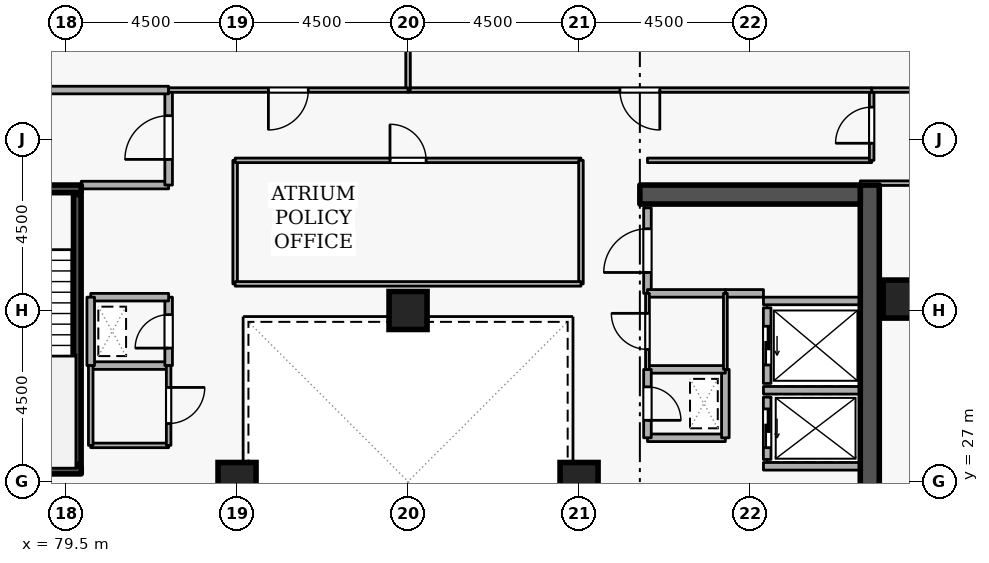
"""IFC4 building model, lengths in metres.
Left out: names, types, materials, properties, quantities, classifications, styles, units other than length and angle.
Written with IfcOpenShell. Run it as: python <this file> out.ifc"""

import sys

from ifc_helpers import new_model, si_unit, direction, frame, frame_2d, origin, origin_2d, place, context, subcontext, project, spatial, rectangle, extrude, element, fill, save


model = new_model("IFC4")
c1 = context("Model", 3, precision=1e-05, world=origin(), true_north=direction((0.0, 1.0)))
c2 = subcontext(c1, "Body", "Model", "MODEL_VIEW")
j1 = project(units=[si_unit("LENGTHUNIT", "METRE"), si_unit("PLANEANGLEUNIT", "RADIAN")], contexts=[c1])
p1 = place(None, origin())
s1 = spatial("IfcSite", under=j1, at=p1, CompositionType="ELEMENT")
p2 = place(p1, origin())
s2 = spatial("IfcBuilding", under=s1, at=p2, CompositionType="ELEMENT")
p3 = place(p2, frame((0.0, 0.0, 236.7)))
s3 = spatial("IfcBuildingStorey", under=s2, at=p3, CompositionType="ELEMENT", Elevation=236.7)
p4 = place(p3, frame((100.65, 19.2, 0.0), z_axis=(0.0, 0.0, 1.0), x_axis=(0.0, 1.0, 0.0)))
e1 = element("IfcWall", 1, at=p4, inside=s3, PredefinedType="SHEAR", context=c2, shape_type="SweptSolid", body=[
    extrude(rectangle(XDim=15.6, YDim=0.5, at=frame_2d((7.8, 0.0))), origin(), (0.0, 0.0, 1.0), 3.6),
])
p5 = place(p3, frame((94.6, 34.55, 0.0), z_axis=(0.0, 0.0, 1.0), x_axis=(1.0, 0.0, 0.0)))
e2 = element("IfcWall", 2, at=p5, inside=s3, PredefinedType="SHEAR", context=c2, shape_type="SweptSolid", body=[
    extrude(rectangle(XDim=5.8, YDim=0.5, at=frame_2d((2.9, 0.0))), origin(), (0.0, 0.0, 1.0), 3.6),
])
for number, where, z_axis, x_axis in (
    (3, (101.5, 31.8, 0.0), (0.0, 0.0, 1.0), (1.0, 0.0, 0.0)),
    (4, (93.0, 27.0, 0.0), (0.0, 0.0, 1.0), (1.0, 0.0, 0.0)),
    (5, (84.0, 27.0, 0.0), (0.0, 0.0, 1.0), (1.0, 0.0, 0.0)),
    (6, (88.5, 31.5, 0.0), (0.0, 0.0, 1.0), (1.0, 0.0, 0.0)),
):
    element("IfcColumn", number, at=place(p3, frame(where, z_axis=z_axis, x_axis=x_axis)), inside=s3, PredefinedType="COLUMN", context=c2, shape_type="SweptSolid", body=[
        extrude(rectangle(XDim=1.0, YDim=1.0, at=origin_2d()), origin(), (0.0, 0.0, 1.0), 3.6),
    ])
p6 = place(p3, frame((97.95, 29.22, 0.0), z_axis=(0.0, 0.0, 1.0), x_axis=(0.0, -1.0, 0.0)))
e7 = element("IfcWall", 7, at=p6, inside=s3, PredefinedType="STANDARD", context=c2, shape_type="SweptSolid", body=[
    extrude(rectangle(XDim=1.64, YDim=0.2, at=frame_2d((0.82, 0.0))), origin(), (0.0, 0.0, 1.0), 3.34),
])
p7 = place(p6, frame((0.31, 0.0, 0.0)))
e8 = element("IfcOpeningElement", 8, at=p7, cuts=e7, PredefinedType="OPENING", context=c2, shape_type="SweptSolid", body=[
    extrude(rectangle(XDim=1.02, YDim=2.06, at=frame_2d((0.51, 1.03))), frame((0.0, 0.11, 0.0), z_axis=(0.0, -1.0, 0.0), x_axis=(1.0, 0.0, 0.0)), (0.0, 0.0, 1.0), 0.22),
])
p8 = place(p3, frame((97.95, 31.57, 0.0), z_axis=(0.0, 0.0, 1.0), x_axis=(0.0, -1.0, 0.0)))
e9 = element("IfcWall", 9, at=p8, inside=s3, PredefinedType="STANDARD", context=c2, shape_type="SweptSolid", body=[
    extrude(rectangle(XDim=1.99, YDim=0.2, at=frame_2d((0.995, 0.0))), origin(), (0.0, 0.0, 1.0), 3.34),
])
p9 = place(p8, frame((0.485, 0.0, 0.0)))
e10 = element("IfcOpeningElement", 10, at=p9, cuts=e9, PredefinedType="OPENING", context=c2, shape_type="SweptSolid", body=[
    extrude(rectangle(XDim=1.02, YDim=2.06, at=frame_2d((0.51, 1.03))), frame((0.0, 0.11, 0.0), z_axis=(0.0, -1.0, 0.0), x_axis=(1.0, 0.0, 0.0)), (0.0, 0.0, 1.0), 0.22),
])
for number, where, z_axis, x_axis in (
    (11, (97.852, 29.4, 0.0), (0.0, 0.0, 1.0), (1.0, 0.0, 0.0)),
    (12, (97.852, 27.4, 0.0), (0.0, 0.0, 1.0), (1.0, 0.0, 0.0)),
    (13, (97.852, 31.75, 0.0), (0.0, 0.0, 1.0), (1.0, 0.0, 0.0)),
):
    element("IfcWall", number, at=place(p3, frame(where, z_axis=z_axis, x_axis=x_axis)), inside=s3, PredefinedType="STANDARD", context=c2, shape_type="SweptSolid", body=[
        extrude(rectangle(XDim=2.536, YDim=0.2, at=frame_2d((1.268, 0.0))), origin(), (0.0, 0.0, 1.0), 3.34),
    ])
p10 = place(p3, frame((76.55, 34.7, 0.0), z_axis=(0.0, 0.0, 1.0), x_axis=(1.0, 0.0, 0.0)))
e14 = element("IfcWall", 14, at=p10, inside=s3, PredefinedType="SHEAR", context=c2, shape_type="SweptSolid", body=[
    extrude(rectangle(XDim=3.35, YDim=0.2, at=frame_2d((1.675, 0.0))), origin(), (0.0, 0.0, 1.0), 3.6),
])
p11 = place(p10, frame((1.125, 0.0, 0.0)))
e15 = element("IfcOpeningElement", 15, at=p11, cuts=e14, PredefinedType="OPENING", context=c2, shape_type="SweptSolid", body=[
    extrude(rectangle(XDim=1.1, YDim=2.1, at=frame_2d((0.55, 1.05))), frame((0.0, 0.11, 0.0), z_axis=(0.0, -1.0, 0.0), x_axis=(1.0, 0.0, 0.0)), (0.0, 0.0, 1.0), 0.22),
])
p12 = place(p3, frame((79.9, 27.3, 0.0), z_axis=(0.0, 0.0, 1.0), x_axis=(-1.0, 0.0, 0.0)))
e16 = element("IfcWall", 16, at=p12, inside=s3, PredefinedType="SHEAR", context=c2, shape_type="SweptSolid", body=[
    extrude(rectangle(XDim=3.35, YDim=0.2, at=frame_2d((1.675, 0.0))), origin(), (0.0, 0.0, 1.0), 3.6),
])
p13 = place(p3, frame((79.797, 27.45, 0.0), z_axis=(0.0, 0.0, 1.0), x_axis=(0.0, 1.0, 0.0)))
e17 = element("IfcWall", 17, at=p13, inside=s3, PredefinedType="SHEAR", context=c2, shape_type="SweptSolid", body=[
    extrude(rectangle(XDim=7.1, YDim=0.2, at=frame_2d((3.55, 0.0))), origin(), (0.0, 0.0, 1.0), 3.6),
])
p14 = place(p3, frame((79.9, 34.8, 0.0), z_axis=(0.0, 0.0, 1.0), x_axis=(1.0, 0.0, 0.0)))
e18 = element("IfcWall", 18, at=p14, inside=s3, PredefinedType="STANDARD", context=c2, shape_type="SweptSolid", body=[
    extrude(rectangle(XDim=2.3, YDim=0.2, at=frame_2d((1.15, 0.0))), origin(), (0.0, 0.0, 1.0), 2.545),
])
p15 = place(p3, frame((82.2, 34.8, 0.0), z_axis=(0.0, 0.0, 1.0), x_axis=(0.0, 1.0, 0.0)))
e19 = element("IfcWall", 19, at=p15, inside=s3, PredefinedType="STANDARD", context=c2, shape_type="SweptSolid", body=[
    extrude(rectangle(XDim=2.5, YDim=0.2, at=frame_2d((1.25, 0.0))), origin(), (0.0, 0.0, 1.0), 3.34),
])
p16 = place(p15, frame((0.675, 0.0, 0.0)))
e20 = element("IfcOpeningElement", 20, at=p16, cuts=e19, PredefinedType="OPENING", context=c2, shape_type="SweptSolid", body=[
    extrude(rectangle(XDim=1.15, YDim=2.1, at=frame_2d((0.575, 1.05))), frame((0.0, 0.11, 0.0), z_axis=(0.0, -1.0, 0.0), x_axis=(1.0, 0.0, 0.0)), (0.0, 0.0, 1.0), 0.22),
])
p17 = place(p3, frame((82.2, 37.3, 0.0), z_axis=(0.0, 0.0, 1.0), x_axis=(-1.0, 0.0, 0.0)))
e21 = element("IfcWall", 21, at=p17, inside=s3, PredefinedType="STANDARD", context=c2, shape_type="SweptSolid", body=[
    extrude(rectangle(XDim=5.7, YDim=0.2, at=frame_2d((2.85, 0.0))), origin(), (0.0, 0.0, 1.0), 3.34),
])
p18 = place(p3, frame((94.8, 28.15, 0.0), z_axis=(0.0, 0.0, 1.0), x_axis=(1.0, 0.0, 0.0)))
e22 = element("IfcWall", 22, at=p18, inside=s3, PredefinedType="STANDARD", context=c2, shape_type="SweptSolid", body=[
    extrude(rectangle(XDim=2.05, YDim=0.2, at=frame_2d((1.025, 0.0))), origin(), (0.0, 0.0, 1.0), 3.34),
])
p19 = place(p3, frame((96.85, 28.15, 0.0), z_axis=(0.0, 0.0, 1.0), x_axis=(0.0, 1.0, 0.0)))
e23 = element("IfcWall", 23, at=p19, inside=s3, PredefinedType="STANDARD", context=c2, shape_type="SweptSolid", body=[
    extrude(rectangle(XDim=1.8, YDim=0.2, at=frame_2d((0.9, 0.0))), origin(), (0.0, 0.0, 1.0), 3.34),
])
p20 = place(p3, frame((96.85, 29.95, 0.0), z_axis=(0.0, 0.0, 1.0), x_axis=(-1.0, 0.0, 0.0)))
e24 = element("IfcWall", 24, at=p20, inside=s3, PredefinedType="STANDARD", context=c2, shape_type="SweptSolid", body=[
    extrude(rectangle(XDim=2.05, YDim=0.2, at=frame_2d((1.025, 0.0))), origin(), (0.0, 0.0, 1.0), 3.34),
])
p21 = place(p3, frame((94.8, 29.95, 0.0), z_axis=(0.0, 0.0, 1.0), x_axis=(0.0, -1.0, 0.0)))
e25 = element("IfcWall", 25, at=p21, inside=s3, PredefinedType="STANDARD", context=c2, shape_type="SweptSolid", body=[
    extrude(rectangle(XDim=1.8, YDim=0.2, at=frame_2d((0.9, 0.0))), origin(), (0.0, 0.0, 1.0), 3.34),
])
p22 = place(p21, frame((0.46, 0.0, 0.0)))
e26 = element("IfcOpeningElement", 26, at=p22, cuts=e25, PredefinedType="OPENING", context=c2, shape_type="SweptSolid", body=[
    extrude(rectangle(XDim=0.88, YDim=2.04, at=frame_2d((0.44, 1.02))), frame((0.0, 0.11, 0.0), z_axis=(0.0, -1.0, 0.0), x_axis=(1.0, 0.0, 0.0)), (0.0, 0.0, 1.0), 0.22),
])
p23 = place(p3, frame((80.15, 30.05, 0.0), z_axis=(0.0, 0.0, 1.0), x_axis=(1.0, 0.0, 0.0)))
e27 = element("IfcWall", 27, at=p23, inside=s3, PredefinedType="STANDARD", context=c2, shape_type="SweptSolid", body=[
    extrude(rectangle(XDim=2.05, YDim=0.2, at=frame_2d((1.025, 0.0))), origin(), (0.0, 0.0, 1.0), 3.34),
])
p24 = place(p3, frame((82.2, 30.05, 0.0), z_axis=(0.0, 0.0, 1.0), x_axis=(0.0, 1.0, 0.0)))
e28 = element("IfcWall", 28, at=p24, inside=s3, PredefinedType="STANDARD", context=c2, shape_type="SweptSolid", body=[
    extrude(rectangle(XDim=1.8, YDim=0.2, at=frame_2d((0.9, 0.0))), origin(), (0.0, 0.0, 1.0), 3.34),
])
p25 = place(p24, frame((0.46, 0.0, 0.0)))
e29 = element("IfcOpeningElement", 29, at=p25, cuts=e28, PredefinedType="OPENING", context=c2, shape_type="SweptSolid", body=[
    extrude(rectangle(XDim=0.88, YDim=2.04, at=frame_2d((0.44, 1.02))), frame((0.0, 0.11, 0.0), z_axis=(0.0, -1.0, 0.0), x_axis=(1.0, 0.0, 0.0)), (0.0, 0.0, 1.0), 0.22),
])
p26 = place(p3, frame((82.2, 31.85, 0.0), z_axis=(0.0, 0.0, 1.0), x_axis=(-1.0, 0.0, 0.0)))
e30 = element("IfcWall", 30, at=p26, inside=s3, PredefinedType="STANDARD", context=c2, shape_type="SweptSolid", body=[
    extrude(rectangle(XDim=2.05, YDim=0.2, at=frame_2d((1.025, 0.0))), origin(), (0.0, 0.0, 1.0), 3.34),
])
p27 = place(p3, frame((80.15, 31.85, 0.0), z_axis=(0.0, 0.0, 1.0), x_axis=(0.0, -1.0, 0.0)))
e31 = element("IfcWall", 31, at=p27, inside=s3, PredefinedType="STANDARD", context=c2, shape_type="SweptSolid", body=[
    extrude(rectangle(XDim=1.8, YDim=0.2, at=frame_2d((0.9, 0.0))), origin(), (0.0, 0.0, 1.0), 3.34),
])
p28 = place(p3, frame((94.8, 31.95, 0.0), z_axis=(0.0, 0.0, 1.0), x_axis=(0.0, 1.0, 0.0)))
e32 = element("IfcWall", 32, at=p28, inside=s3, PredefinedType="STANDARD", context=c2, shape_type="SweptSolid", body=[
    extrude(rectangle(XDim=2.25, YDim=0.2, at=frame_2d((1.125, 0.0))), origin(), (0.0, 0.0, 1.0), 3.34),
])
p29 = place(p28, frame((0.55, 0.0, 0.0)))
e33 = element("IfcOpeningElement", 33, at=p29, cuts=e32, PredefinedType="OPENING", context=c2, shape_type="SweptSolid", body=[
    extrude(rectangle(XDim=1.15, YDim=2.1, at=frame_2d((0.575, 1.05))), frame((0.0, 0.11, 0.0), z_axis=(0.0, -1.0, 0.0), x_axis=(1.0, 0.0, 0.0)), (0.0, 0.0, 1.0), 0.22),
])
p30 = place(p3, frame((97.852, 31.95, 0.0), z_axis=(0.0, 0.0, 1.0), x_axis=(-1.0, 0.0, 0.0)))
e34 = element("IfcWall", 34, at=p30, inside=s3, PredefinedType="STANDARD", context=c2, shape_type="SweptSolid", body=[
    extrude(rectangle(XDim=1.002, YDim=0.2, at=frame_2d((0.501, 0.0))), origin(), (0.0, 0.0, 1.0), 3.34),
])
p31 = place(p3, frame((96.85, 31.95, 0.0), z_axis=(0.0, 0.0, 1.0), x_axis=(-1.0, 0.0, 0.0)))
e35 = element("IfcWall", 35, at=p31, inside=s3, PredefinedType="STANDARD", context=c2, shape_type="SweptSolid", body=[
    extrude(rectangle(XDim=2.05, YDim=0.2, at=frame_2d((1.025, 0.0))), origin(), (0.0, 0.0, 1.0), 3.34),
])
p32 = place(p3, frame((94.8, 29.95, 0.0), z_axis=(0.0, 0.0, 1.0), x_axis=(0.0, 1.0, 0.0)))
e36 = element("IfcWall", 36, at=p32, inside=s3, PredefinedType="PARTITIONING", context=c2, shape_type="SweptSolid", body=[
    extrude(rectangle(XDim=2.0, YDim=0.1, at=frame_2d((1.0, 0.0))), origin(), (0.0, 0.0, 1.0), 3.34),
])
p33 = place(p32, frame((0.525, 0.0, 0.0)))
e37 = element("IfcOpeningElement", 37, at=p33, cuts=e36, PredefinedType="OPENING", context=c2, shape_type="SweptSolid", body=[
    extrude(rectangle(XDim=0.95, YDim=2.1, at=frame_2d((0.475, 1.05))), frame((0.0, 0.06, 0.0), z_axis=(0.0, -1.0, 0.0), x_axis=(1.0, 0.0, 0.0)), (0.0, 0.0, 1.0), 0.12),
])
p34 = place(p3, frame((96.85, 31.95, 0.0), z_axis=(0.0, 0.0, 1.0), x_axis=(0.0, -1.0, 0.0)))
e38 = element("IfcWall", 38, at=p34, inside=s3, PredefinedType="PARTITIONING", context=c2, shape_type="SweptSolid", body=[
    extrude(rectangle(XDim=2.0, YDim=0.1, at=frame_2d((1.0, 0.0))), origin(), (0.0, 0.0, 1.0), 3.34),
])
p35 = place(p3, frame((82.2, 27.95, 0.0), z_axis=(0.0, 0.0, 1.0), x_axis=(-1.0, 0.0, 0.0)))
e39 = element("IfcWall", 39, at=p35, inside=s3, PredefinedType="PARTITIONING", context=c2, shape_type="SweptSolid", body=[
    extrude(rectangle(XDim=2.05, YDim=0.12, at=frame_2d((1.025, 0.0))), origin(), (0.0, 0.0, 1.0), 3.34),
])
p36 = place(p3, frame((80.15, 27.95, 0.0), z_axis=(0.0, 0.0, 1.0), x_axis=(0.0, 1.0, 0.0)))
e40 = element("IfcWall", 40, at=p36, inside=s3, PredefinedType="PARTITIONING", context=c2, shape_type="SweptSolid", body=[
    extrude(rectangle(XDim=2.1, YDim=0.12, at=frame_2d((1.05, 0.0))), origin(), (0.0, 0.0, 1.0), 3.34),
])
p37 = place(p3, frame((82.2, 30.05, 0.0), z_axis=(0.0, 0.0, 1.0), x_axis=(0.0, -1.0, 0.0)))
e41 = element("IfcWall", 41, at=p37, inside=s3, PredefinedType="PARTITIONING", context=c2, shape_type="SweptSolid", body=[
    extrude(rectangle(XDim=2.1, YDim=0.12, at=frame_2d((1.05, 0.0))), origin(), (0.0, 0.0, 1.0), 3.34),
])
p38 = place(p37, frame((0.575, 0.0, 0.0)))
e42 = element("IfcOpeningElement", 42, at=p38, cuts=e41, PredefinedType="OPENING", context=c2, shape_type="SweptSolid", body=[
    extrude(rectangle(XDim=0.95, YDim=2.1, at=frame_2d((0.475, 1.05))), frame((0.0, 0.07, 0.0), z_axis=(0.0, -1.0, 0.0), x_axis=(1.0, 0.0, 0.0)), (0.0, 0.0, 1.0), 0.14),
])
p39 = place(p3, frame((94.8, 35.45, 0.0), z_axis=(0.0, 0.0, 1.0), x_axis=(1.0, 0.0, 0.0)))
e43 = element("IfcWall", 43, at=p39, inside=s3, PredefinedType="PARTITIONING", context=c2, shape_type="SweptSolid", body=[
    extrude(rectangle(XDim=5.9, YDim=0.12, at=frame_2d((2.95, 0.0))), origin(), (0.0, 0.0, 1.0), 3.34),
])
p40 = place(p3, frame((100.7, 35.45, 0.0), z_axis=(0.0, 0.0, 1.0), x_axis=(0.0, 1.0, 0.0)))
e44 = element("IfcWall", 44, at=p40, inside=s3, PredefinedType="PARTITIONING", context=c2, shape_type="SweptSolid", body=[
    extrude(rectangle(XDim=1.85, YDim=0.12, at=frame_2d((0.925, 0.0))), origin(), (0.0, 0.0, 1.0), 3.34),
])
p41 = place(p40, frame((0.45, 0.0, 0.0)))
e45 = element("IfcOpeningElement", 45, at=p41, cuts=e44, PredefinedType="OPENING", context=c2, shape_type="SweptSolid", body=[
    extrude(rectangle(XDim=0.95, YDim=2.1, at=frame_2d((0.475, 1.05))), frame((0.0, 0.07, 0.0), z_axis=(0.0, -1.0, 0.0), x_axis=(1.0, 0.0, 0.0)), (0.0, 0.0, 1.0), 0.14),
])
p42 = place(p3, frame((100.7, 37.3, 0.0), z_axis=(0.0, 0.0, 1.0), x_axis=(1.0, 0.0, 0.0)))
e46 = element("IfcWall", 46, at=p42, inside=s3, PredefinedType="PARTITIONING", context=c2, shape_type="SweptSolid", body=[
    extrude(rectangle(XDim=11.52, YDim=0.12, at=frame_2d((5.76, 0.0))), origin(), (0.0, 0.0, 1.0), 3.34),
])
p43 = place(p3, frame((112.22, 34.85, 0.0), z_axis=(0.0, 0.0, 1.0), x_axis=(-1.0, 0.0, 0.0)))
e47 = element("IfcWall", 47, at=p43, inside=s3, PredefinedType="PARTITIONING", context=c2, shape_type="SweptSolid", body=[
    extrude(rectangle(XDim=11.82, YDim=0.12, at=frame_2d((5.91, 0.0))), origin(), (0.0, 0.0, 1.0), 2.545),
])
p44 = place(p3, frame((100.7, 37.3, 0.0), z_axis=(0.0, 0.0, 1.0), x_axis=(-1.0, 0.0, 0.0)))
e48 = element("IfcWall", 48, at=p44, inside=s3, PredefinedType="PARTITIONING", context=c2, shape_type="SweptSolid", body=[
    extrude(rectangle(XDim=12.2, YDim=0.12, at=frame_2d((6.1, 0.0))), origin(), (0.0, 0.0, 1.0), 3.34),
])
p45 = place(p44, frame((5.575, 0.0, 0.0)))
e49 = element("IfcOpeningElement", 49, at=p45, cuts=e48, PredefinedType="OPENING", context=c2, shape_type="SweptSolid", body=[
    extrude(rectangle(XDim=1.05, YDim=2.1, at=frame_2d((0.525, 1.05))), frame((0.0, 0.07, 0.0), z_axis=(0.0, -1.0, 0.0), x_axis=(1.0, 0.0, 0.0)), (0.0, 0.0, 1.0), 0.14),
])
p46 = place(p3, frame((88.5, 37.3, 0.0), z_axis=(0.0, 0.0, 1.0), x_axis=(0.0, 1.0, 0.0)))
e50 = element("IfcWall", 50, at=p46, inside=s3, PredefinedType="PARTITIONING", context=c2, shape_type="SweptSolid", body=[
    extrude(rectangle(XDim=7.42, YDim=0.12, at=frame_2d((3.71, 0.0))), origin(), (0.0, 0.0, 1.0), 2.932),
])
p47 = place(p3, frame((88.5, 37.3, 0.0), z_axis=(0.0, 0.0, 1.0), x_axis=(-1.0, 0.0, 0.0)))
e51 = element("IfcWall", 51, at=p47, inside=s3, PredefinedType="PARTITIONING", context=c2, shape_type="SweptSolid", body=[
    extrude(rectangle(XDim=6.3, YDim=0.12, at=frame_2d((3.15, 0.0))), origin(), (0.0, 0.0, 1.0), 3.34),
])
p48 = place(p47, frame((2.625, 0.0, 0.0)))
e52 = element("IfcOpeningElement", 52, at=p48, cuts=e51, PredefinedType="OPENING", context=c2, shape_type="SweptSolid", body=[
    extrude(rectangle(XDim=1.05, YDim=2.1, at=frame_2d((0.525, 1.05))), frame((0.0, 0.07, 0.0), z_axis=(0.0, -1.0, 0.0), x_axis=(1.0, 0.0, 0.0)), (0.0, 0.0, 1.0), 0.14),
])
p49 = place(p3, frame((83.95, 32.2, 0.0), z_axis=(0.0, 0.0, 1.0), x_axis=(0.0, 1.0, 0.0)))
e53 = element("IfcWall", 53, at=p49, inside=s3, PredefinedType="PARTITIONING", context=c2, shape_type="SweptSolid", body=[
    extrude(rectangle(XDim=3.25, YDim=0.12, at=frame_2d((1.625, 0.0))), origin(), (0.0, 0.0, 1.0), 3.34),
])
p50 = place(p3, frame((83.95, 35.45, 0.0), z_axis=(0.0, 0.0, 1.0), x_axis=(1.0, 0.0, 0.0)))
e54 = element("IfcWall", 54, at=p50, inside=s3, PredefinedType="PARTITIONING", context=c2, shape_type="SweptSolid", body=[
    extrude(rectangle(XDim=9.1, YDim=0.12, at=frame_2d((4.55, 0.0))), origin(), (0.0, 0.0, 1.0), 3.34),
])
p51 = place(p50, frame((4.075, 0.0, 0.0)))
e55 = element("IfcOpeningElement", 55, at=p51, cuts=e54, PredefinedType="OPENING", context=c2, shape_type="SweptSolid", body=[
    extrude(rectangle(XDim=0.95, YDim=2.1, at=frame_2d((0.475, 1.05))), frame((0.0, 0.07, 0.0), z_axis=(0.0, -1.0, 0.0), x_axis=(1.0, 0.0, 0.0)), (0.0, 0.0, 1.0), 0.14),
])
p52 = place(p3, frame((93.05, 35.45, 0.0), z_axis=(0.0, 0.0, 1.0), x_axis=(0.0, -1.0, 0.0)))
e56 = element("IfcWall", 56, at=p52, inside=s3, PredefinedType="PARTITIONING", context=c2, shape_type="SweptSolid", body=[
    extrude(rectangle(XDim=3.25, YDim=0.12, at=frame_2d((1.625, 0.0))), origin(), (0.0, 0.0, 1.0), 3.34),
])
p53 = place(p3, frame((93.05, 32.2, 0.0), z_axis=(0.0, 0.0, 1.0), x_axis=(-1.0, 0.0, 0.0)))
e57 = element("IfcWall", 57, at=p53, inside=s3, PredefinedType="PARTITIONING", context=c2, shape_type="SweptSolid", body=[
    extrude(rectangle(XDim=9.1, YDim=0.12, at=frame_2d((4.55, 0.0))), origin(), (0.0, 0.0, 1.0), 3.34),
])
p54 = place(p7, origin())
e58 = element("IfcDoor", 58, at=p54, inside=s3, OperationType="SLIDING_TO_LEFT", PredefinedType="DOOR", context=c2, shape_type="SweptSolid", body=[
    extrude(rectangle(XDim=1.02, YDim=2.06, at=frame_2d((0.51, 1.03))), frame((0.0, 0.025, 0.0), z_axis=(0.0, -1.0, 0.0), x_axis=(1.0, 0.0, 0.0)), (0.0, 0.0, 1.0), 0.05),
])
fill(e8, e58)
p55 = place(p9, origin())
e59 = element("IfcDoor", 59, at=p55, inside=s3, OperationType="SLIDING_TO_LEFT", PredefinedType="DOOR", context=c2, shape_type="SweptSolid", body=[
    extrude(rectangle(XDim=1.02, YDim=2.06, at=frame_2d((0.51, 1.03))), frame((0.0, 0.025, 0.0), z_axis=(0.0, -1.0, 0.0), x_axis=(1.0, 0.0, 0.0)), (0.0, 0.0, 1.0), 0.05),
])
fill(e10, e59)
p56 = place(p16, origin())
e60 = element("IfcDoor", 60, at=p56, inside=s3, OperationType="SINGLE_SWING_LEFT", PredefinedType="DOOR", context=c2, shape_type="SweptSolid", body=[
    extrude(rectangle(XDim=1.15, YDim=2.1, at=frame_2d((0.575, 1.05))), frame((0.0, 0.025, 0.0), z_axis=(0.0, -1.0, 0.0), x_axis=(1.0, 0.0, 0.0)), (0.0, 0.0, 1.0), 0.05),
])
fill(e20, e60)
p57 = place(p22, origin())
e61 = element("IfcDoor", 61, at=p57, inside=s3, OperationType="SINGLE_SWING_RIGHT", PredefinedType="DOOR", context=c2, shape_type="SweptSolid", body=[
    extrude(rectangle(XDim=0.88, YDim=2.04, at=frame_2d((0.44, 1.02))), frame((0.0, 0.025, 0.0), z_axis=(0.0, -1.0, 0.0), x_axis=(1.0, 0.0, 0.0)), (0.0, 0.0, 1.0), 0.05),
])
fill(e26, e61)
p58 = place(p25, origin())
e62 = element("IfcDoor", 62, at=p58, inside=s3, OperationType="SINGLE_SWING_LEFT", PredefinedType="DOOR", context=c2, shape_type="SweptSolid", body=[
    extrude(rectangle(XDim=0.88, YDim=2.04, at=frame_2d((0.44, 1.02))), frame((0.0, 0.025, 0.0), z_axis=(0.0, -1.0, 0.0), x_axis=(1.0, 0.0, 0.0)), (0.0, 0.0, 1.0), 0.05),
])
fill(e29, e62)
p59 = place(p33, origin())
e63 = element("IfcDoor", 63, at=p59, inside=s3, OperationType="SINGLE_SWING_RIGHT", PredefinedType="DOOR", context=c2, shape_type="SweptSolid", body=[
    extrude(rectangle(XDim=0.95, YDim=2.1, at=frame_2d((0.475, 1.05))), frame((0.0, 0.025, 0.0), z_axis=(0.0, -1.0, 0.0), x_axis=(1.0, 0.0, 0.0)), (0.0, 0.0, 1.0), 0.05),
])
fill(e37, e63)
p60 = place(p29, origin())
e64 = element("IfcDoor", 64, at=p60, inside=s3, OperationType="SINGLE_SWING_LEFT", PredefinedType="DOOR", context=c2, shape_type="SweptSolid", body=[
    extrude(rectangle(XDim=1.15, YDim=2.1, at=frame_2d((0.575, 1.05))), frame((0.0, 0.025, 0.0), z_axis=(0.0, -1.0, 0.0), x_axis=(1.0, 0.0, 0.0)), (0.0, 0.0, 1.0), 0.05),
])
fill(e33, e64)
p61 = place(p38, origin())
e65 = element("IfcDoor", 65, at=p61, inside=s3, OperationType="SINGLE_SWING_LEFT", PredefinedType="DOOR", context=c2, shape_type="SweptSolid", body=[
    extrude(rectangle(XDim=0.95, YDim=2.1, at=frame_2d((0.475, 1.05))), frame((0.0, 0.025, 0.0), z_axis=(0.0, -1.0, 0.0), x_axis=(1.0, 0.0, 0.0)), (0.0, 0.0, 1.0), 0.05),
])
fill(e42, e65)
p62 = place(p41, origin())
e66 = element("IfcDoor", 66, at=p62, inside=s3, OperationType="SINGLE_SWING_LEFT", PredefinedType="DOOR", context=c2, shape_type="SweptSolid", body=[
    extrude(rectangle(XDim=0.95, YDim=2.1, at=frame_2d((0.475, 1.05))), frame((0.0, 0.025, 0.0), z_axis=(0.0, -1.0, 0.0), x_axis=(1.0, 0.0, 0.0)), (0.0, 0.0, 1.0), 0.05),
])
fill(e45, e66)
p63 = place(p45, origin())
e67 = element("IfcDoor", 67, at=p63, inside=s3, OperationType="SINGLE_SWING_LEFT", PredefinedType="DOOR", context=c2, shape_type="SweptSolid", body=[
    extrude(rectangle(XDim=1.05, YDim=2.1, at=frame_2d((0.525, 1.05))), frame((0.0, 0.025, 0.0), z_axis=(0.0, -1.0, 0.0), x_axis=(1.0, 0.0, 0.0)), (0.0, 0.0, 1.0), 0.05),
])
fill(e49, e67)
p64 = place(p48, origin())
e68 = element("IfcDoor", 68, at=p64, inside=s3, OperationType="SINGLE_SWING_RIGHT", PredefinedType="DOOR", context=c2, shape_type="SweptSolid", body=[
    extrude(rectangle(XDim=1.05, YDim=2.1, at=frame_2d((0.525, 1.05))), frame((0.0, 0.025, 0.0), z_axis=(0.0, -1.0, 0.0), x_axis=(1.0, 0.0, 0.0)), (0.0, 0.0, 1.0), 0.05),
])
fill(e52, e68)
p65 = place(p51, origin())
e69 = element("IfcDoor", 69, at=p65, inside=s3, OperationType="SINGLE_SWING_LEFT", PredefinedType="DOOR", context=c2, shape_type="SweptSolid", body=[
    extrude(rectangle(XDim=0.95, YDim=2.1, at=frame_2d((0.475, 1.05))), frame((0.0, 0.025, 0.0), z_axis=(0.0, -1.0, 0.0), x_axis=(1.0, 0.0, 0.0)), (0.0, 0.0, 1.0), 0.05),
])
fill(e55, e69)
save(model, sys.argv[1])
